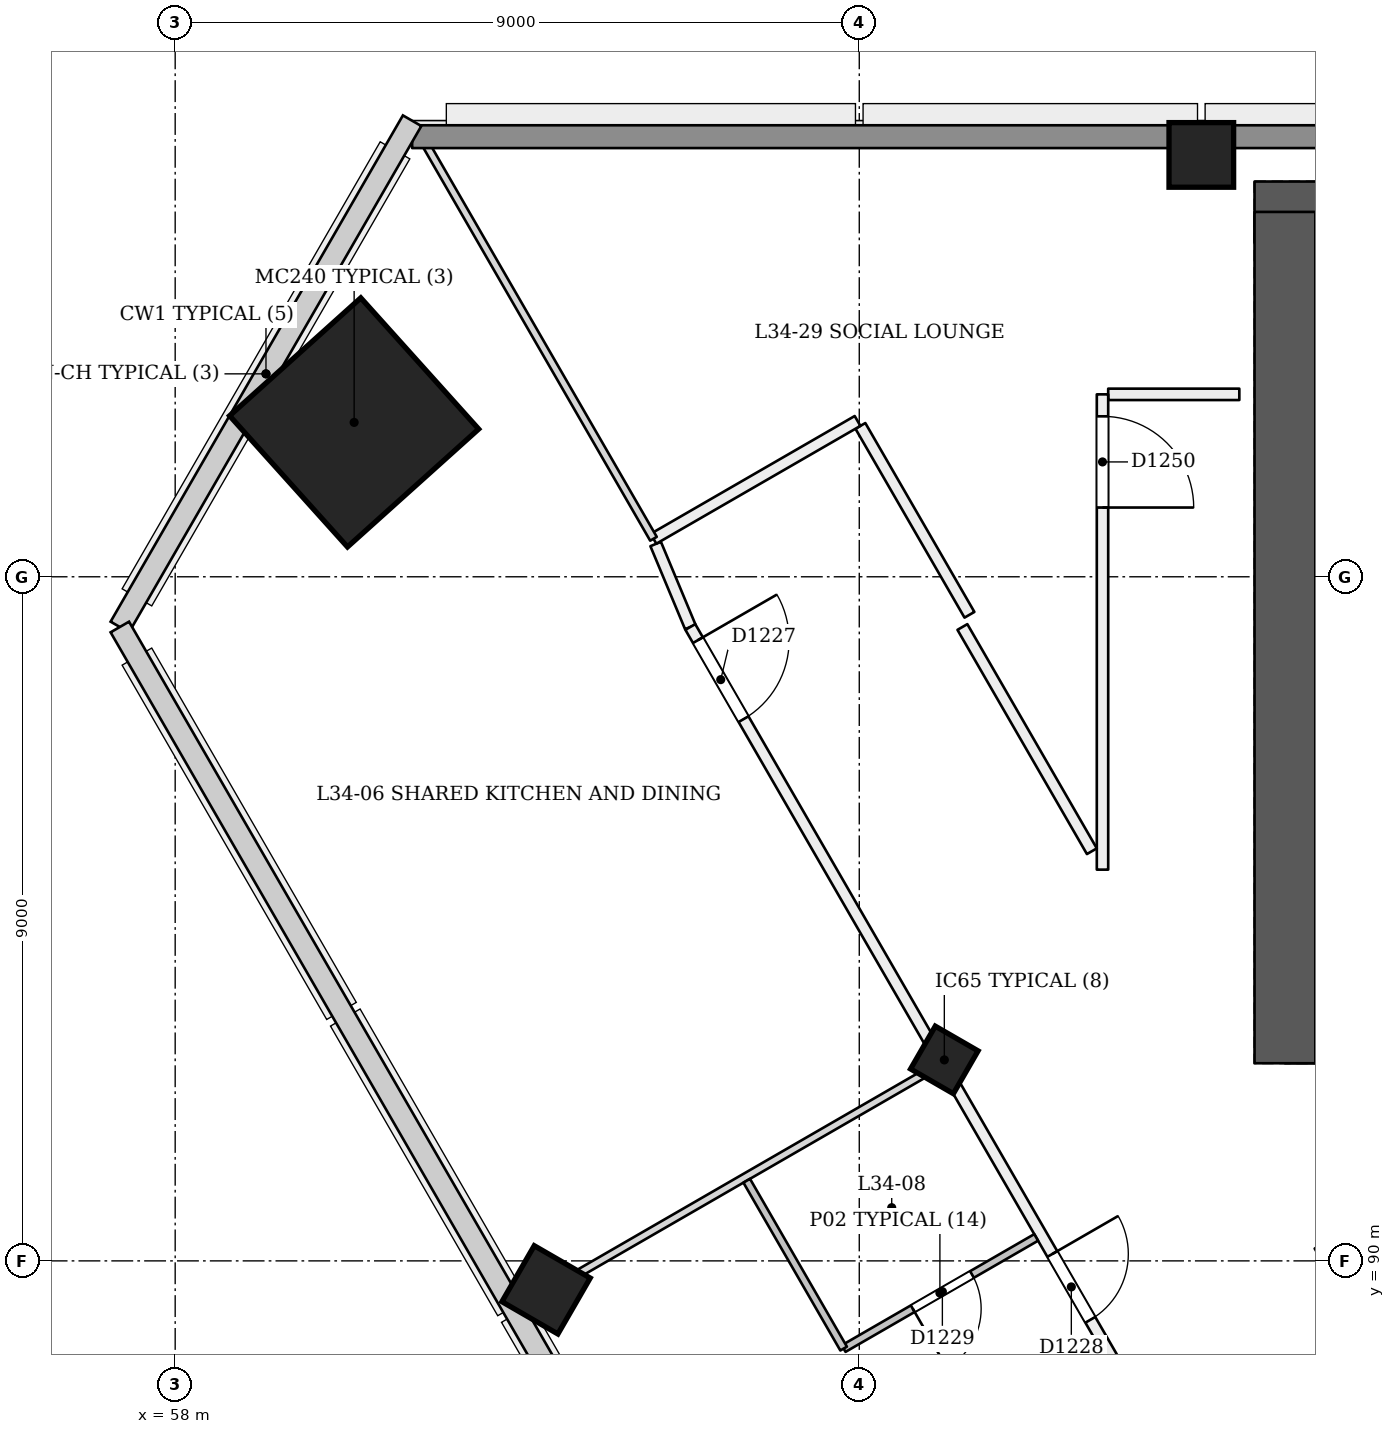
"""IFC4 building model, lengths in metres.
Left out: names, types, materials, properties, quantities, classifications, styles, units other than length and angle.
Written with IfcOpenShell. Run it as: python <this file> out.ifc"""

import sys

from ifc_helpers import new_model, si_unit, direction, frame, frame_2d, origin, origin_2d, place, context, subcontext, project, spatial, rectangle, extrude, element, fill, save


model = new_model("IFC4")
c1 = context("Model", 3, precision=1e-05, world=origin(), true_north=direction((0.0, 1.0)))
c2 = subcontext(c1, "Body", "Model", "MODEL_VIEW")
j1 = project(units=[si_unit("LENGTHUNIT", "METRE"), si_unit("PLANEANGLEUNIT", "RADIAN")], contexts=[c1])
p1 = place(None, origin())
s1 = spatial("IfcSite", under=j1, at=p1, CompositionType="ELEMENT")
p2 = place(p1, origin())
s2 = spatial("IfcBuilding", under=s1, at=p2, CompositionType="ELEMENT")
p3 = place(p2, frame((0.0, 0.0, 135.0)))
s3 = spatial("IfcBuildingStorey", under=s2, at=p3, CompositionType="ELEMENT", Elevation=135.0)
p4 = place(p3, frame((72.6, 93.0, 0.0), z_axis=(0.0, 0.0, 1.0), x_axis=(1.0, 0.0, 0.0)))
e1 = element("IfcWall", 1, at=p4, inside=s3, PredefinedType="SHEAR", context=c2, shape_type="SweptSolid", body=[
    extrude(rectangle(XDim=25.2, YDim=0.8, at=frame_2d((12.6, 0.0))), origin(), (0.0, 0.0, 1.0), 3.6),
])
p5 = place(p4, frame((1.2, 0.0, 0.0)))
e2 = element("IfcOpeningElement", 2, at=p5, cuts=e1, PredefinedType="OPENING", context=c2, shape_type="SweptSolid", body=[
    extrude(rectangle(XDim=1.2, YDim=2.1, at=frame_2d((0.6, 1.05))), frame((0.0, 0.411, 0.0), z_axis=(0.0, -1.0, 0.0), x_axis=(1.0, 0.0, 0.0)), (0.0, 0.0, 1.0), 0.821),
])
p6 = place(p4, frame((3.4, 0.0, 0.0)))
e3 = element("IfcOpeningElement", 3, at=p6, cuts=e1, PredefinedType="OPENING", context=c2, shape_type="SweptSolid", body=[
    extrude(rectangle(XDim=1.2, YDim=2.1, at=frame_2d((0.6, 1.05))), frame((0.0, 0.411, 0.0), z_axis=(0.0, -1.0, 0.0), x_axis=(1.0, 0.0, 0.0)), (0.0, 0.0, 1.0), 0.821),
])
p7 = place(p4, frame((13.4, 0.0, 0.0)))
e4 = element("IfcOpeningElement", 4, at=p7, cuts=e1, PredefinedType="OPENING", context=c2, shape_type="SweptSolid", body=[
    extrude(rectangle(XDim=1.2, YDim=2.1, at=frame_2d((0.6, 1.05))), frame((0.0, 0.411, 0.0), z_axis=(0.0, -1.0, 0.0), x_axis=(1.0, 0.0, 0.0)), (0.0, 0.0, 1.0), 0.821),
])
p8 = place(p4, frame((16.062, 0.0, 0.0)))
e5 = element("IfcOpeningElement", 5, at=p8, cuts=e1, PredefinedType="OPENING", context=c2, shape_type="SweptSolid", body=[
    extrude(rectangle(XDim=1.0, YDim=2.1, at=frame_2d((0.5, 1.05))), frame((0.0, 0.411, 0.0), z_axis=(0.0, -1.0, 0.0), x_axis=(1.0, 0.0, 0.0)), (0.0, 0.0, 1.0), 0.821),
])
p9 = place(p4, frame((18.85, 0.0, 0.0)))
e6 = element("IfcOpeningElement", 6, at=p9, cuts=e1, PredefinedType="OPENING", context=c2, shape_type="SweptSolid", body=[
    extrude(rectangle(XDim=1.0, YDim=2.1, at=frame_2d((0.5, 1.05))), frame((0.0, 0.411, 0.0), z_axis=(0.0, -1.0, 0.0), x_axis=(1.0, 0.0, 0.0)), (0.0, 0.0, 1.0), 0.821),
])
p10 = place(p4, frame((22.038, 0.0, 0.0)))
e7 = element("IfcOpeningElement", 7, at=p10, cuts=e1, PredefinedType="OPENING", context=c2, shape_type="SweptSolid", body=[
    extrude(rectangle(XDim=1.0, YDim=2.1, at=frame_2d((0.5, 1.05))), frame((0.0, 0.411, 0.0), z_axis=(0.0, -1.0, 0.0), x_axis=(1.0, 0.0, 0.0)), (0.0, 0.0, 1.0), 0.821),
])
p11 = place(p3, frame((97.4, 103.8, 0.0), z_axis=(0.0, 0.0, 1.0), x_axis=(-1.0, 0.0, 0.0)))
e8 = element("IfcWall", 8, at=p11, inside=s3, PredefinedType="SHEAR", context=c2, shape_type="SweptSolid", body=[
    extrude(rectangle(XDim=25.2, YDim=0.8, at=frame_2d((12.6, 0.0))), origin(), (0.0, 0.0, 1.0), 3.6),
])
p12 = place(p3, frame((72.6, 103.8, 0.0), z_axis=(0.0, 0.0, 1.0), x_axis=(0.0, -1.0, 0.0)))
e9 = element("IfcWall", 9, at=p12, inside=s3, PredefinedType="SHEAR", context=c2, shape_type="SweptSolid", body=[
    extrude(rectangle(XDim=11.2, YDim=0.8, at=frame_2d((5.6, 0.0))), origin(), (0.0, 0.0, 1.0), 3.6),
])
p13 = place(p3, frame((68.092, 92.597, -0.02), z_axis=(0.02222134892, 0.038480872521, 0.999012229206), x_axis=(-0.865640972658, -0.499184117772, 0.038482762642)))
e10 = element("IfcColumn", 10, at=p13, inside=s3, PredefinedType="COLUMN", context=c2, shape_type="SweptSolid", body=[
    extrude(rectangle(XDim=0.65, YDim=0.65, at=origin_2d()), origin(), (0.0, 0.0, 1.0), 3.604),
])
p14 = place(p3, frame((60.32, 101.02, 0.0), z_axis=(0.028401814599, 0.009218727412, 0.999554076572), x_axis=(-0.865127429794, 0.501154791875, 0.019960080116)))
e11 = element("IfcColumn", 11, at=p14, inside=s3, PredefinedType="COLUMN", context=c2, shape_type="SweptSolid", body=[
    extrude(rectangle(XDim=2.32, YDim=2.32, at=origin_2d()), origin(), (0.0, 0.0, 1.0), 3.602),
])
p15 = place(p3, frame((71.5, 104.55, 0.0), z_axis=(0.0, 0.0, 1.0), x_axis=(1.0, 0.0, 0.0)))
e12 = element("IfcColumn", 12, at=p15, inside=s3, PredefinedType="COLUMN", context=c2, shape_type="SweptSolid", body=[
    extrude(rectangle(XDim=0.85, YDim=0.85, at=origin_2d()), origin(), (0.0, 0.0, 1.0), 3.6),
])
p16 = place(p3, frame((62.852, 89.572, -0.026), z_axis=(0.022221406801, 0.038413224561, 0.999014831351), x_axis=(-0.866020255575, -0.498529722392, 0.038432184757)))
e13 = element("IfcColumn", 13, at=p16, inside=s3, PredefinedType="COLUMN", context=c2, shape_type="SweptSolid", body=[
    extrude(rectangle(XDim=0.85, YDim=0.85, at=origin_2d()), origin(), (0.0, 0.0, 1.0), 3.604),
])
p17 = place(p3, frame((64.321, 99.431, 0.0), z_axis=(0.0, 0.0, 1.0), x_axis=(0.385435693092, -0.92273469995, 0.0)))
e14 = element("IfcWall", 14, at=p17, inside=s3, PredefinedType="PARTITIONING", context=c2, shape_type="SweptSolid", body=[
    extrude(rectangle(XDim=1.183, YDim=0.15, at=frame_2d((0.592, 0.0))), origin(), (0.0, 0.0, 1.0), 3.15),
])
p18 = place(p3, frame((64.777, 98.34, 0.0), z_axis=(0.0, 0.0, 1.0), x_axis=(0.499997513821, -0.866026839176, 0.0)))
e15 = element("IfcWall", 15, at=p18, inside=s3, PredefinedType="PARTITIONING", context=c2, shape_type="SweptSolid", body=[
    extrude(rectangle(XDim=40.26, YDim=0.15, at=frame_2d((20.13, 0.0))), origin(), (0.0, 0.0, 1.0), 2.75),
])
p19 = place(p18, frame((0.2, 0.0, 0.0)))
e16 = element("IfcOpeningElement", 16, at=p19, cuts=e15, PredefinedType="OPENING", context=c2, shape_type="SweptSolid", body=[
    extrude(rectangle(XDim=1.2, YDim=2.1, at=frame_2d((0.6, 1.05))), frame((0.0, 0.085, 0.0), z_axis=(0.0, -1.0, 0.0), x_axis=(1.0, 0.0, 0.0)), (0.0, 0.0, 1.0), 0.171),
])
p20 = place(p18, frame((9.525, 0.0, 0.0)))
e17 = element("IfcOpeningElement", 17, at=p20, cuts=e15, PredefinedType="OPENING", context=c2, shape_type="SweptSolid", body=[
    extrude(rectangle(XDim=1.0, YDim=2.1, at=frame_2d((0.5, 1.05))), frame((0.0, 0.085, 0.0), z_axis=(0.0, -1.0, 0.0), x_axis=(1.0, 0.0, 0.0)), (0.0, 0.0, 1.0), 0.171),
])
p21 = place(p18, frame((11.735, 0.0, 0.0)))
e18 = element("IfcOpeningElement", 18, at=p21, cuts=e15, PredefinedType="OPENING", context=c2, shape_type="SweptSolid", body=[
    extrude(rectangle(XDim=1.0, YDim=2.1, at=frame_2d((0.5, 1.05))), frame((0.0, 0.085, 0.0), z_axis=(0.0, -1.0, 0.0), x_axis=(1.0, 0.0, 0.0)), (0.0, 0.0, 1.0), 0.171),
])
p22 = place(p18, frame((19.53, 0.0, 0.0)))
e19 = element("IfcOpeningElement", 19, at=p22, cuts=e15, PredefinedType="OPENING", context=c2, shape_type="SweptSolid", body=[
    extrude(rectangle(XDim=1.2, YDim=2.1, at=frame_2d((0.6, 1.05))), frame((0.0, 0.085, 0.0), z_axis=(0.0, -1.0, 0.0), x_axis=(1.0, 0.0, 0.0)), (0.0, 0.0, 1.0), 0.171),
])
p23 = place(p18, frame((27.41, 0.0, 0.0)))
e20 = element("IfcOpeningElement", 20, at=p23, cuts=e15, PredefinedType="OPENING", context=c2, shape_type="SweptSolid", body=[
    extrude(rectangle(XDim=1.0, YDim=2.1, at=frame_2d((0.5, 1.05))), frame((0.0, 0.085, 0.0), z_axis=(0.0, -1.0, 0.0), x_axis=(1.0, 0.0, 0.0)), (0.0, 0.0, 1.0), 0.171),
])
p24 = place(p18, frame((34.13, 0.0, 0.0)))
e21 = element("IfcOpeningElement", 21, at=p24, cuts=e15, PredefinedType="OPENING", context=c2, shape_type="SweptSolid", body=[
    extrude(rectangle(XDim=1.2, YDim=2.1, at=frame_2d((0.6, 1.05))), frame((0.0, 0.085, 0.0), z_axis=(0.0, -1.0, 0.0), x_axis=(1.0, 0.0, 0.0)), (0.0, 0.0, 1.0), 0.171),
])
p25 = place(p18, frame((38.78, 0.0, 0.0)))
e22 = element("IfcOpeningElement", 22, at=p25, cuts=e15, PredefinedType="OPENING", context=c2, shape_type="SweptSolid", body=[
    extrude(rectangle(XDim=1.0, YDim=2.1, at=frame_2d((0.5, 1.05))), frame((0.0, 0.085, 0.0), z_axis=(0.0, -1.0, 0.0), x_axis=(1.0, 0.0, 0.0)), (0.0, 0.0, 1.0), 0.171),
])
p26 = place(p3, frame((72.0, 101.4, 0.0), z_axis=(0.0, 0.0, 1.0), x_axis=(-1.0, 0.0, 0.0)))
e23 = element("IfcWall", 23, at=p26, inside=s3, PredefinedType="PARTITIONING", context=c2, shape_type="SweptSolid", body=[
    extrude(rectangle(XDim=1.725, YDim=0.15, at=frame_2d((0.863, 0.0))), origin(), (0.0, 0.0, 1.0), 3.15),
])
p27 = place(p3, frame((70.2, 101.4, 0.0), z_axis=(0.0, 0.0, 1.0), x_axis=(0.0, -1.0, 0.0)))
e24 = element("IfcWall", 24, at=p27, inside=s3, PredefinedType="PARTITIONING", context=c2, shape_type="SweptSolid", body=[
    extrude(rectangle(XDim=6.253, YDim=0.15, at=frame_2d((3.126, 0.0))), origin(), (0.0, 0.0, 1.0), 3.15),
])
p28 = place(p27, frame((0.289, 0.0, 0.0)))
e25 = element("IfcOpeningElement", 25, at=p28, cuts=e24, PredefinedType="OPENING", context=c2, shape_type="SweptSolid", body=[
    extrude(rectangle(XDim=1.2, YDim=2.1, at=frame_2d((0.6, 1.05))), frame((0.0, 0.085, 0.0), z_axis=(0.0, -1.0, 0.0), x_axis=(1.0, 0.0, 0.0)), (0.0, 0.0, 1.0), 0.171),
])
p29 = place(p3, frame((70.06, 95.389, 0.0), z_axis=(0.0, 0.0, 1.0), x_axis=(-0.499962338254, 0.866047146712, 0.0)))
e26 = element("IfcWall", 26, at=p29, inside=s3, PredefinedType="PARTITIONING", context=c2, shape_type="SweptSolid", body=[
    extrude(rectangle(XDim=3.406, YDim=0.15, at=frame_2d((1.703, 0.0))), origin(), (0.0, 0.0, 1.0), 3.15),
])
p30 = place(p3, frame((68.449, 98.5, 0.0), z_axis=(0.0, 0.0, 1.0), x_axis=(-0.499945861543, 0.866056658381, 0.0)))
e27 = element("IfcWall", 27, at=p30, inside=s3, PredefinedType="PARTITIONING", context=c2, shape_type="SweptSolid", body=[
    extrude(rectangle(XDim=2.869, YDim=0.15, at=frame_2d((1.435, 0.0))), origin(), (0.0, 0.0, 1.0), 3.15),
])
p31 = place(p3, frame((66.977, 101.05, 0.0), z_axis=(0.0, 0.0, 1.0), x_axis=(-0.86600983753, -0.500026960575, 0.0)))
e28 = element("IfcWall", 28, at=p31, inside=s3, PredefinedType="PARTITIONING", context=c2, shape_type="SweptSolid", body=[
    extrude(rectangle(XDim=3.1, YDim=0.15, at=frame_2d((1.55, 0.0))), origin(), (0.0, 0.0, 1.0), 3.15),
])
p32 = place(p3, frame((85.0, 69.513, 0.0), z_axis=(0.0, 0.0, 1.0), x_axis=(-0.500001724231, 0.866024408297, 0.0)))
e29 = element("IfcWall", 29, at=p32, inside=s3, PredefinedType="PARTITIONING", context=c2, shape_type="SweptSolid", body=[
    extrude(rectangle(XDim=23.888, YDim=0.15, at=frame_2d((11.944, 0.0))), origin(), (0.0, 0.0, 1.0), 3.15),
])
p33 = place(p32, frame((21.016, 0.0, 0.0)))
e30 = element("IfcOpeningElement", 30, at=p33, cuts=e29, PredefinedType="OPENING", context=c2, shape_type="SweptSolid", body=[
    extrude(rectangle(XDim=0.9, YDim=2.1, at=frame_2d((0.45, 1.05))), frame((0.0, 0.085, 0.0), z_axis=(0.0, -1.0, 0.0), x_axis=(1.0, 0.0, 0.0)), (0.0, 0.0, 1.0), 0.171),
])
p34 = place(p32, frame((13.865, 0.0, 0.0)))
e31 = element("IfcOpeningElement", 31, at=p34, cuts=e29, PredefinedType="OPENING", context=c2, shape_type="SweptSolid", body=[
    extrude(rectangle(XDim=0.9, YDim=2.1, at=frame_2d((0.45, 1.05))), frame((0.0, 0.085, 0.0), z_axis=(0.0, -1.0, 0.0), x_axis=(1.0, 0.0, 0.0)), (0.0, 0.0, 1.0), 0.171),
])
p35 = place(p32, frame((10.767, 0.0, 0.0)))
e32 = element("IfcOpeningElement", 32, at=p35, cuts=e29, PredefinedType="OPENING", context=c2, shape_type="SweptSolid", body=[
    extrude(rectangle(XDim=1.0, YDim=2.1, at=frame_2d((0.5, 1.05))), frame((0.0, 0.085, 0.0), z_axis=(0.0, -1.0, 0.0), x_axis=(1.0, 0.0, 0.0)), (0.0, 0.0, 1.0), 0.171),
])
p36 = place(p32, frame((5.609, 0.0, 0.0)))
e33 = element("IfcOpeningElement", 33, at=p36, cuts=e29, PredefinedType="OPENING", context=c2, shape_type="SweptSolid", body=[
    extrude(rectangle(XDim=1.0, YDim=2.1, at=frame_2d((0.5, 1.05))), frame((0.0, 0.085, 0.0), z_axis=(0.0, -1.0, 0.0), x_axis=(1.0, 0.0, 0.0)), (0.0, 0.0, 1.0), 0.171),
])
p37 = place(p32, frame((17.351, 0.0, 0.0)))
e34 = element("IfcOpeningElement", 34, at=p37, cuts=e29, PredefinedType="OPENING", context=c2, shape_type="SweptSolid", body=[
    extrude(rectangle(XDim=1.0, YDim=2.1, at=frame_2d((0.5, 1.05))), frame((0.0, 0.085, 0.0), z_axis=(0.0, -1.0, 0.0), x_axis=(1.0, 0.0, 0.0)), (0.0, 0.0, 1.0), 0.171),
])
p38 = place(p3, frame((62.55, 89.398, 0.0), z_axis=(0.0, 0.0, 1.0), x_axis=(0.866015887322, 0.500016482634, 0.0)))
e35 = element("IfcWall", 35, at=p38, inside=s3, PredefinedType="PARTITIONING", context=c2, shape_type="SweptSolid", body=[
    extrude(rectangle(XDim=6.325, YDim=0.1, at=frame_2d((3.163, 0.0))), origin(), (0.0, 0.0, 1.0), 2.65),
])
p39 = place(p3, frame((64.293, 99.5, 0.0), z_axis=(0.0, 0.0, 1.0), x_axis=(-0.500004896655, 0.866022576681, 0.0)))
e36 = element("IfcWall", 36, at=p39, inside=s3, PredefinedType="PARTITIONING", context=c2, shape_type="SweptSolid", body=[
    extrude(rectangle(XDim=6.235, YDim=0.1, at=frame_2d((3.118, 0.0))), origin(), (0.0, 0.0, 1.0), 2.65),
])
p40 = place(p3, frame((69.327, 90.309, 0.0), z_axis=(0.0, 0.0, 1.0), x_axis=(-0.86601045545, -0.500025890382, 0.0)))
e37 = element("IfcWall", 37, at=p40, inside=s3, PredefinedType="PARTITIONING", context=c2, shape_type="SweptSolid", body=[
    extrude(rectangle(XDim=2.925, YDim=0.1, at=frame_2d((1.462, 0.0))), origin(), (0.0, 0.0, 1.0), 3.15),
])
p41 = place(p40, frame((0.975, 0.0, 0.0)))
e38 = element("IfcOpeningElement", 38, at=p41, cuts=e37, PredefinedType="OPENING", context=c2, shape_type="SweptSolid", body=[
    extrude(rectangle(XDim=0.9, YDim=2.1, at=frame_2d((0.45, 1.05))), frame((0.0, 0.061, 0.0), z_axis=(0.0, -1.0, 0.0), x_axis=(1.0, 0.0, 0.0)), (0.0, 0.0, 1.0), 0.121),
])
p42 = place(p3, frame((66.794, 88.846, 0.0), z_axis=(0.0, 0.0, 1.0), x_axis=(-0.499948979701, 0.866054858364, 0.0)))
e39 = element("IfcWall", 39, at=p42, inside=s3, PredefinedType="PARTITIONING", context=c2, shape_type="SweptSolid", body=[
    extrude(rectangle(XDim=2.55, YDim=0.1, at=frame_2d((1.275, 0.0))), origin(), (0.0, 0.0, 1.0), 2.75),
])
p43 = place(p3, frame((61.117, 104.79, 0.0), z_axis=(0.0, 0.0, 1.0), x_axis=(1.0, 0.0, 0.0)))
e40 = element("IfcWall", 40, at=p43, inside=s3, PredefinedType="SOLIDWALL", context=c2, shape_type="SweptSolid", body=[
    extrude(rectangle(XDim=47.766, YDim=0.3, at=frame_2d((23.883, 0.0))), origin(), (0.0, 0.0, 1.0), 2.65),
])
p44 = place(p19, origin())
e41 = element("IfcDoor", 41, at=p44, inside=s3, OperationType="SINGLE_SWING_LEFT", PredefinedType="NOTDEFINED", context=c2, shape_type="SweptSolid", body=[
    extrude(rectangle(XDim=1.2, YDim=2.1, at=frame_2d((0.6, 1.05))), frame((0.0, 0.025, 0.0), z_axis=(0.0, -1.0, 0.0), x_axis=(1.0, 0.0, 0.0)), (0.0, 0.0, 1.0), 0.05),
])
fill(e16, e41)
p45 = place(p20, origin())
e42 = element("IfcDoor", 42, at=p45, inside=s3, OperationType="SINGLE_SWING_LEFT", PredefinedType="NOTDEFINED", context=c2, shape_type="SweptSolid", body=[
    extrude(rectangle(XDim=1.0, YDim=2.1, at=frame_2d((0.5, 1.05))), frame((0.0, 0.025, 0.0), z_axis=(0.0, -1.0, 0.0), x_axis=(1.0, 0.0, 0.0)), (0.0, 0.0, 1.0), 0.05),
])
fill(e17, e42)
p46 = place(p41, origin())
e43 = element("IfcDoor", 43, at=p46, inside=s3, OperationType="SINGLE_SWING_RIGHT", PredefinedType="NOTDEFINED", context=c2, shape_type="SweptSolid", body=[
    extrude(rectangle(XDim=0.9, YDim=2.1, at=frame_2d((0.45, 1.05))), frame((0.0, 0.025, 0.0), z_axis=(0.0, -1.0, 0.0), x_axis=(1.0, 0.0, 0.0)), (0.0, 0.0, 1.0), 0.05),
])
fill(e38, e43)
p47 = place(p28, origin())
e44 = element("IfcDoor", 44, at=p47, inside=s3, OperationType="SINGLE_SWING_RIGHT", PredefinedType="NOTDEFINED", context=c2, shape_type="SweptSolid", body=[
    extrude(rectangle(XDim=1.2, YDim=2.1, at=frame_2d((0.6, 1.05))), frame((0.0, 0.025, 0.0), z_axis=(0.0, -1.0, 0.0), x_axis=(1.0, 0.0, 0.0)), (0.0, 0.0, 1.0), 0.05),
])
fill(e25, e44)
save(model, sys.argv[1])
